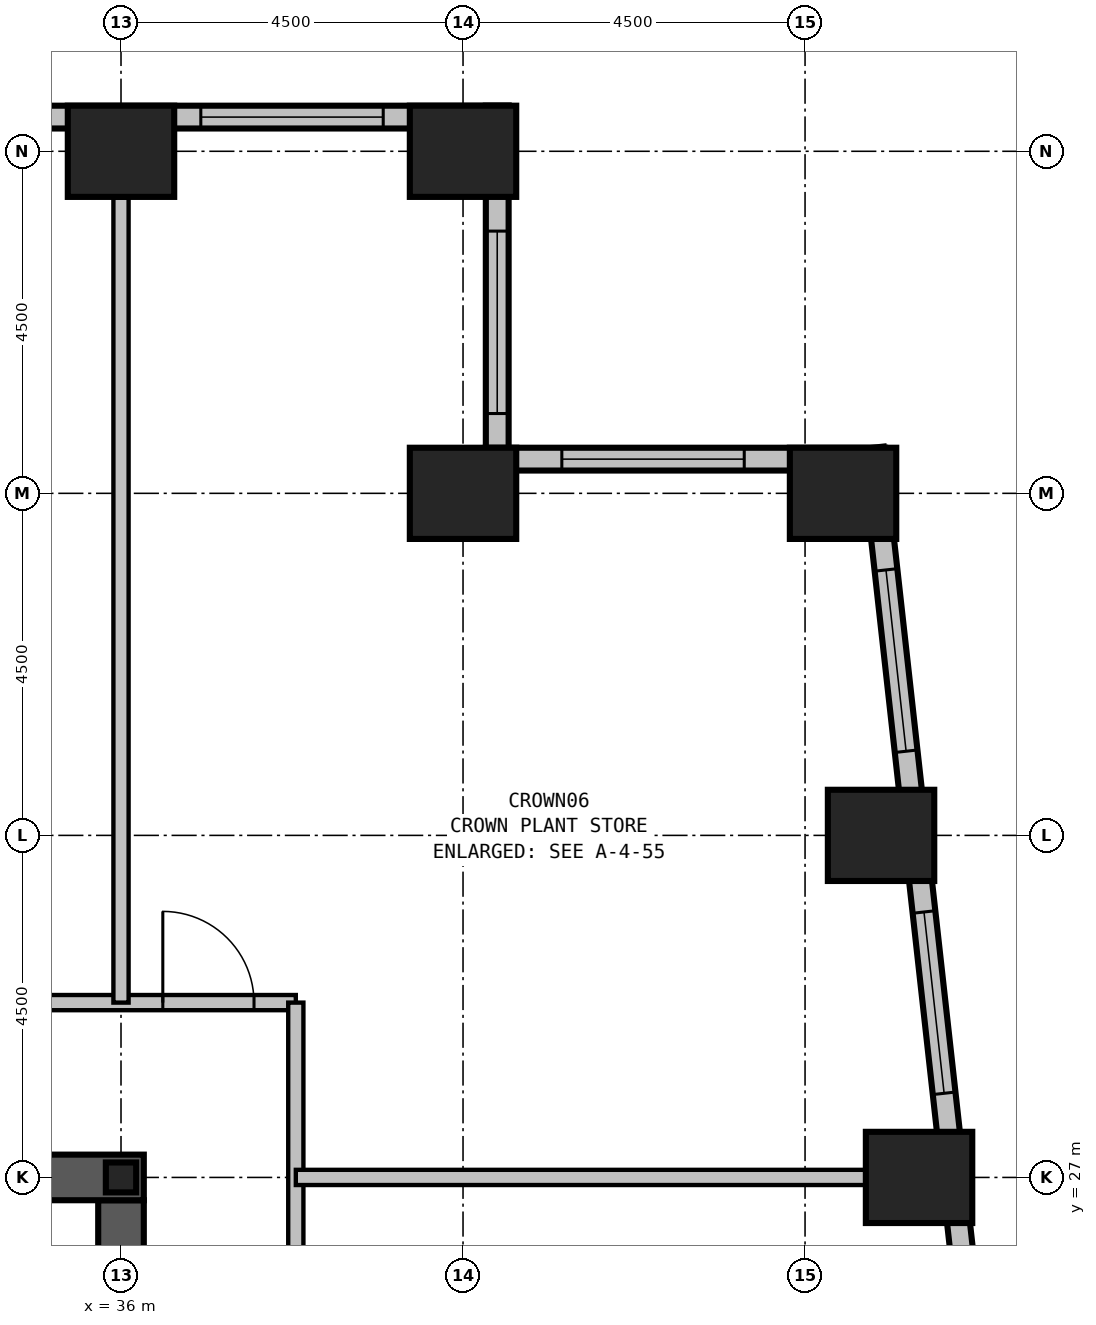
"""IFC4 building model, lengths in metres.
Left out: names, types, materials, properties, quantities, classifications, styles, units other than length and angle.
Written with IfcOpenShell. Run it as: python <this file> out.ifc"""

import sys

from ifc_helpers import new_model, si_unit, direction, frame, frame_2d, origin, origin_2d, place, context, subcontext, project, spatial, polyline, rectangle, i_section, outline, extrude, clip, halfspace, element, fill, save


model = new_model("IFC4")
c1 = context("Model", 3, precision=1e-05, world=origin(), true_north=direction((0.0, 1.0)))
c2 = subcontext(c1, "Body", "Model", "MODEL_VIEW")
j1 = project(units=[si_unit("LENGTHUNIT", "METRE"), si_unit("PLANEANGLEUNIT", "RADIAN")], contexts=[c1])
p1 = place(None, origin())
s1 = spatial("IfcSite", under=j1, at=p1, CompositionType="ELEMENT")
p2 = place(p1, origin())
s2 = spatial("IfcBuilding", under=s1, at=p2, CompositionType="ELEMENT")
p3 = place(p2, frame((0.0, 0.0, 289.7)))
s3 = spatial("IfcBuildingStorey", under=s2, at=p3, CompositionType="ELEMENT", Elevation=289.7)
p4 = place(p3, frame((46.5, 27.0, 0.0), z_axis=(0.0, 0.0, 1.0), x_axis=(1.0, 0.0, 0.0)))
e1 = element("IfcColumn", 1, at=p4, inside=s3, PredefinedType="COLUMN", context=c2, shape_type="Clipping", body=[
    clip(extrude(rectangle(XDim=1.4, YDim=1.2, at=origin_2d()), origin(), (0.0, 0.0, 1.0), 19.823), halfspace(frame((0.0, 0.0, 19.871), z_axis=(-0.294483896091, -0.25767390908, 0.920262675285), x_axis=(0.952424195267, 0.0, 0.304775576894)), False)),
])
p5 = place(p3, frame((46.0, 31.5, 0.0), z_axis=(0.0, 0.0, 1.0), x_axis=(1.0, 0.0, 0.0)))
e2 = element("IfcColumn", 2, at=p5, inside=s3, PredefinedType="COLUMN", context=c2, shape_type="Clipping", body=[
    clip(extrude(rectangle(XDim=1.4, YDim=1.2, at=origin_2d()), origin(), (0.0, 0.0, 1.0), 20.923), halfspace(frame((0.0, 0.0, 20.971), z_axis=(-0.294483896091, -0.25767390908, 0.920262675285), x_axis=(0.952424195267, 0.0, 0.304775576894)), False)),
])
p6 = place(p3, frame((45.5, 36.0, 0.0), z_axis=(0.0, 0.0, 1.0), x_axis=(1.0, 0.0, 0.0)))
e3 = element("IfcColumn", 3, at=p6, inside=s3, PredefinedType="COLUMN", context=c2, shape_type="Clipping", body=[
    clip(extrude(rectangle(XDim=1.4, YDim=1.2, at=origin_2d()), origin(), (0.0, 0.0, 1.0), 22.023), halfspace(frame((0.0, 0.0, 22.071), z_axis=(-0.294483896091, -0.25767390908, 0.920262675285), x_axis=(0.952424195267, 0.0, 0.304775576894)), False)),
])
p7 = place(p3, frame((40.5, 36.0, 0.0), z_axis=(0.0, 0.0, 1.0), x_axis=(1.0, 0.0, 0.0)))
e4 = element("IfcColumn", 4, at=p7, inside=s3, PredefinedType="COLUMN", context=c2, shape_type="Clipping", body=[
    clip(extrude(rectangle(XDim=1.4, YDim=1.2, at=origin_2d()), origin(), (0.0, 0.0, 1.0), 20.423), halfspace(frame((0.0, 0.0, 20.471), z_axis=(-0.294483896091, -0.25767390908, 0.920262675285), x_axis=(0.952424195267, 0.0, 0.304775576894)), False)),
])
p8 = place(p3, frame((40.5, 40.5, 0.0), z_axis=(0.0, 0.0, 1.0), x_axis=(1.0, 0.0, 0.0)))
e5 = element("IfcColumn", 5, at=p8, inside=s3, PredefinedType="COLUMN", context=c2, shape_type="Clipping", body=[
    clip(extrude(rectangle(XDim=1.4, YDim=1.2, at=origin_2d()), origin(), (0.0, 0.0, 1.0), 21.683), halfspace(frame((0.0, 0.0, 21.731), z_axis=(-0.294483896091, -0.25767390908, 0.920262675285), x_axis=(0.952424195267, 0.0, 0.304775576894)), False)),
])
p9 = place(p3, frame((36.0, 40.5, 0.0), z_axis=(0.0, 0.0, 1.0), x_axis=(1.0, 0.0, 0.0)))
e6 = element("IfcColumn", 6, at=p9, inside=s3, PredefinedType="COLUMN", context=c2, shape_type="Clipping", body=[
    clip(extrude(rectangle(XDim=1.4, YDim=1.2, at=origin_2d()), origin(), (0.0, 0.0, 1.0), 20.243), halfspace(frame((0.0, 0.0, 20.291), z_axis=(-0.294483896091, -0.25767390908, 0.920262675285), x_axis=(0.952424195267, 0.0, 0.304775576894)), False)),
])
p10 = place(p3, frame((36.3, 27.0, 0.0), z_axis=(0.0, 0.0, 1.0), x_axis=(-1.0, 0.0, 0.0)))
e7 = element("IfcWall", 7, at=p10, inside=s3, PredefinedType="SHEAR", context=c2, shape_type="SweptSolid", body=[
    extrude(rectangle(XDim=23.6, YDim=0.6, at=frame_2d((11.8, 0.0))), origin(), (0.0, 0.0, 1.0), 4.0),
])
p11 = place(p10, frame((17.05, 0.0, 0.0)))
e8 = element("IfcOpeningElement", 8, at=p11, cuts=e7, PredefinedType="OPENING", context=c2, shape_type="SweptSolid", body=[
    extrude(rectangle(XDim=1.0, YDim=2.1, at=frame_2d((0.5, 1.05))), frame((0.0, 0.31, 0.0), z_axis=(0.0, -1.0, 0.0), x_axis=(1.0, 0.0, 0.0)), (0.0, 0.0, 1.0), 0.62),
])
p12 = place(p10, frame((12.05, 0.0, 0.0)))
e9 = element("IfcOpeningElement", 9, at=p12, cuts=e7, PredefinedType="OPENING", context=c2, shape_type="SweptSolid", body=[
    extrude(rectangle(XDim=1.0, YDim=2.1, at=frame_2d((0.5, 1.05))), frame((0.0, 0.31, 0.0), z_axis=(0.0, -1.0, 0.0), x_axis=(1.0, 0.0, 0.0)), (0.0, 0.0, 1.0), 0.62),
])
p13 = place(p10, frame((7.05, 0.0, 0.0)))
e10 = element("IfcOpeningElement", 10, at=p13, cuts=e7, PredefinedType="OPENING", context=c2, shape_type="SweptSolid", body=[
    extrude(rectangle(XDim=1.0, YDim=2.1, at=frame_2d((0.5, 1.05))), frame((0.0, 0.31, 0.0), z_axis=(0.0, -1.0, 0.0), x_axis=(1.0, 0.0, 0.0)), (0.0, 0.0, 1.0), 0.62),
])
p14 = place(p3, frame((36.0, 20.0, 0.0), z_axis=(0.0, 0.0, 1.0), x_axis=(0.0, 1.0, 0.0)))
e11 = element("IfcWall", 11, at=p14, inside=s3, PredefinedType="SHEAR", context=c2, shape_type="SweptSolid", body=[
    extrude(rectangle(XDim=6.7, YDim=0.6, at=frame_2d((3.35, 0.0))), origin(), (0.0, 0.0, 1.0), 4.0),
])
p15 = place(p3, frame((36.0, 27.0, 4.0), z_axis=(0.0, 0.0, 1.0), x_axis=(1.0, 0.0, 0.0)))
e12 = element("IfcColumn", 12, at=p15, inside=s3, PredefinedType="COLUMN", context=c2, shape_type="SweptSolid", body=[
    extrude(i_section(OverallWidth=0.399, OverallDepth=0.394, WebThickness=0.023, FlangeThickness=0.037, FilletRadius=0.015, at=origin_2d()), origin(), (0.0, 0.0, 1.0), 11.49),
])
p16 = place(p3, frame((49.519, 3.901, -0.3), z_axis=(0.0, 0.0, 1.0), x_axis=(-0.110429082637, 0.993884006164, 0.0)))
e13 = element("IfcWall", 13, at=p16, inside=s3, PredefinedType="STANDARD", context=c2, shape_type="Clipping", body=[
    clip(extrude(outline(polyline([(0.0, 0.0), (32.899, 0.0), (32.899, 22.662), (0.0, 14.669), (0.0, 0.0)])), frame((0.0, 0.15, 0.0), z_axis=(0.0, -1.0, 0.0), x_axis=(1.0, 0.0, 0.0)), (0.0, 0.0, 1.0), 0.3), halfspace(frame((0.0, 0.0, 14.669), z_axis=(-0.223578390543, 0.321137527797, 0.920262675285), x_axis=(0.971732868163, 0.0, 0.236083105984)), False)),
])
p17 = place(p16, frame((1.717, 0.0, 0.8)))
e14 = element("IfcOpeningElement", 14, at=p17, cuts=e13, PredefinedType="OPENING", context=c2, shape_type="SweptSolid", body=[
    extrude(rectangle(XDim=2.4, YDim=1.8, at=frame_2d((1.2, 0.9))), frame((0.0, 0.16, 0.0), z_axis=(0.0, -1.0, 0.0), x_axis=(1.0, 0.0, 0.0)), (0.0, 0.0, 1.0), 0.32),
])
p18 = place(p16, frame((6.245, 0.0, 0.8)))
e15 = element("IfcOpeningElement", 15, at=p18, cuts=e13, PredefinedType="OPENING", context=c2, shape_type="SweptSolid", body=[
    extrude(rectangle(XDim=2.4, YDim=1.8, at=frame_2d((1.2, 0.9))), frame((0.0, 0.16, 0.0), z_axis=(0.0, -1.0, 0.0), x_axis=(1.0, 0.0, 0.0)), (0.0, 0.0, 1.0), 0.32),
])
p19 = place(p16, frame((10.772, 0.0, 0.8)))
e16 = element("IfcOpeningElement", 16, at=p19, cuts=e13, PredefinedType="OPENING", context=c2, shape_type="SweptSolid", body=[
    extrude(rectangle(XDim=2.4, YDim=1.8, at=frame_2d((1.2, 0.9))), frame((0.0, 0.16, 0.0), z_axis=(0.0, -1.0, 0.0), x_axis=(1.0, 0.0, 0.0)), (0.0, 0.0, 1.0), 0.32),
])
p20 = place(p16, frame((15.3, 0.0, 0.8)))
e17 = element("IfcOpeningElement", 17, at=p20, cuts=e13, PredefinedType="OPENING", context=c2, shape_type="SweptSolid", body=[
    extrude(rectangle(XDim=2.4, YDim=1.8, at=frame_2d((1.2, 0.9))), frame((0.0, 0.16, 0.0), z_axis=(0.0, -1.0, 0.0), x_axis=(1.0, 0.0, 0.0)), (0.0, 0.0, 1.0), 0.32),
])
p21 = place(p16, frame((19.828, 0.0, 0.8)))
e18 = element("IfcOpeningElement", 18, at=p21, cuts=e13, PredefinedType="OPENING", context=c2, shape_type="SweptSolid", body=[
    extrude(rectangle(XDim=2.4, YDim=1.8, at=frame_2d((1.2, 0.9))), frame((0.0, 0.16, 0.0), z_axis=(0.0, -1.0, 0.0), x_axis=(1.0, 0.0, 0.0)), (0.0, 0.0, 1.0), 0.32),
])
p22 = place(p16, frame((24.355, 0.0, 0.8)))
e19 = element("IfcOpeningElement", 19, at=p22, cuts=e13, PredefinedType="OPENING", context=c2, shape_type="SweptSolid", body=[
    extrude(rectangle(XDim=2.4, YDim=1.8, at=frame_2d((1.2, 0.9))), frame((0.0, 0.16, 0.0), z_axis=(0.0, -1.0, 0.0), x_axis=(1.0, 0.0, 0.0)), (0.0, 0.0, 1.0), 0.32),
])
p23 = place(p16, frame((28.883, 0.0, 0.8)))
e20 = element("IfcOpeningElement", 20, at=p23, cuts=e13, PredefinedType="OPENING", context=c2, shape_type="SweptSolid", body=[
    extrude(rectangle(XDim=2.4, YDim=1.8, at=frame_2d((1.2, 0.9))), frame((0.0, 0.16, 0.0), z_axis=(0.0, -1.0, 0.0), x_axis=(1.0, 0.0, 0.0)), (0.0, 0.0, 1.0), 0.32),
])
p24 = place(p3, frame((46.053, 36.45, -0.3), z_axis=(0.0, 0.0, 1.0), x_axis=(-1.0, 0.0, 0.0)))
e21 = element("IfcWall", 21, at=p24, inside=s3, PredefinedType="STANDARD", context=c2, shape_type="Clipping", body=[
    clip(extrude(outline(polyline([(0.0, 0.0), (5.253, 0.0), (5.253, 20.993), (0.0, 22.674), (0.0, 0.0)])), frame((0.0, 0.15, 0.0), z_axis=(0.0, -1.0, 0.0), x_axis=(1.0, 0.0, 0.0)), (0.0, 0.0, 1.0), 0.3), halfspace(frame((0.0, 0.0, 22.674), z_axis=(0.294483896091, 0.25767390908, 0.920262675285), x_axis=(0.952424195267, 0.0, -0.304775576894)), False)),
])
p25 = place(p24, frame((1.853, 0.0, 0.8)))
e22 = element("IfcOpeningElement", 22, at=p25, cuts=e21, PredefinedType="OPENING", context=c2, shape_type="SweptSolid", body=[
    extrude(rectangle(XDim=2.4, YDim=1.8, at=frame_2d((1.2, 0.9))), frame((0.0, 0.16, 0.0), z_axis=(0.0, -1.0, 0.0), x_axis=(1.0, 0.0, 0.0)), (0.0, 0.0, 1.0), 0.32),
])
p26 = place(p3, frame((40.95, 36.3, -0.3), z_axis=(0.0, 0.0, 1.0), x_axis=(0.0, 1.0, 0.0)))
e23 = element("IfcWall", 23, at=p26, inside=s3, PredefinedType="STANDARD", context=c2, shape_type="Clipping", body=[
    clip(extrude(outline(polyline([(0.0, 0.0), (4.8, 0.0), (4.8, 22.343), (0.0, 20.999), (0.0, 0.0)])), frame((0.0, 0.15, 0.0), z_axis=(0.0, -1.0, 0.0), x_axis=(1.0, 0.0, 0.0)), (0.0, 0.0, 1.0), 0.3), halfspace(frame((0.0, 0.0, 20.999), z_axis=(-0.25767390908, 0.294483896091, 0.920262675285), x_axis=(0.962963921905, 0.0, 0.269630274838)), False)),
])
p27 = place(p26, frame((0.75, 0.0, 0.8)))
e24 = element("IfcOpeningElement", 24, at=p27, cuts=e23, PredefinedType="OPENING", context=c2, shape_type="SweptSolid", body=[
    extrude(rectangle(XDim=2.4, YDim=1.8, at=frame_2d((1.2, 0.9))), frame((0.0, 0.16, 0.0), z_axis=(0.0, -1.0, 0.0), x_axis=(1.0, 0.0, 0.0)), (0.0, 0.0, 1.0), 0.32),
])
p28 = place(p3, frame((41.1, 40.95, -0.3), z_axis=(0.0, 0.0, 1.0), x_axis=(-1.0, 0.0, 0.0)))
e25 = element("IfcWall", 25, at=p28, inside=s3, PredefinedType="STANDARD", context=c2, shape_type="Clipping", body=[
    clip(extrude(outline(polyline([(0.0, 0.0), (28.153, 0.0), (28.153, 13.34), (0.0, 22.349), (0.0, 0.0)])), frame((0.0, 0.15, 0.0), z_axis=(0.0, -1.0, 0.0), x_axis=(1.0, 0.0, 0.0)), (0.0, 0.0, 1.0), 0.3), halfspace(frame((0.0, 0.0, 22.349), z_axis=(0.294483896091, 0.25767390908, 0.920262675285), x_axis=(0.952424195267, 0.0, -0.304775576894)), False)),
])
p29 = place(p28, frame((1.65, 0.0, 0.8)))
e26 = element("IfcOpeningElement", 26, at=p29, cuts=e25, PredefinedType="OPENING", context=c2, shape_type="SweptSolid", body=[
    extrude(rectangle(XDim=2.4, YDim=1.8, at=frame_2d((1.2, 0.9))), frame((0.0, 0.16, 0.0), z_axis=(0.0, -1.0, 0.0), x_axis=(1.0, 0.0, 0.0)), (0.0, 0.0, 1.0), 0.32),
])
p30 = place(p28, frame((6.15, 0.0, 0.8)))
e27 = element("IfcOpeningElement", 27, at=p30, cuts=e25, PredefinedType="OPENING", context=c2, shape_type="SweptSolid", body=[
    extrude(rectangle(XDim=2.4, YDim=1.8, at=frame_2d((1.2, 0.9))), frame((0.0, 0.16, 0.0), z_axis=(0.0, -1.0, 0.0), x_axis=(1.0, 0.0, 0.0)), (0.0, 0.0, 1.0), 0.32),
])
p31 = place(p28, frame((10.65, 0.0, 0.8)))
e28 = element("IfcOpeningElement", 28, at=p31, cuts=e25, PredefinedType="OPENING", context=c2, shape_type="SweptSolid", body=[
    extrude(rectangle(XDim=2.4, YDim=1.8, at=frame_2d((1.2, 0.9))), frame((0.0, 0.16, 0.0), z_axis=(0.0, -1.0, 0.0), x_axis=(1.0, 0.0, 0.0)), (0.0, 0.0, 1.0), 0.32),
])
p32 = place(p28, frame((15.15, 0.0, 0.8)))
e29 = element("IfcOpeningElement", 29, at=p32, cuts=e25, PredefinedType="OPENING", context=c2, shape_type="SweptSolid", body=[
    extrude(rectangle(XDim=2.4, YDim=1.8, at=frame_2d((1.2, 0.9))), frame((0.0, 0.16, 0.0), z_axis=(0.0, -1.0, 0.0), x_axis=(1.0, 0.0, 0.0)), (0.0, 0.0, 1.0), 0.32),
])
p33 = place(p28, frame((19.65, 0.0, 0.8)))
e30 = element("IfcOpeningElement", 30, at=p33, cuts=e25, PredefinedType="OPENING", context=c2, shape_type="SweptSolid", body=[
    extrude(rectangle(XDim=2.4, YDim=1.8, at=frame_2d((1.2, 0.9))), frame((0.0, 0.16, 0.0), z_axis=(0.0, -1.0, 0.0), x_axis=(1.0, 0.0, 0.0)), (0.0, 0.0, 1.0), 0.32),
])
p34 = place(p28, frame((24.15, 0.0, 0.8)))
e31 = element("IfcOpeningElement", 31, at=p34, cuts=e25, PredefinedType="OPENING", context=c2, shape_type="SweptSolid", body=[
    extrude(rectangle(XDim=2.4, YDim=1.8, at=frame_2d((1.2, 0.9))), frame((0.0, 0.16, 0.0), z_axis=(0.0, -1.0, 0.0), x_axis=(1.0, 0.0, 0.0)), (0.0, 0.0, 1.0), 0.32),
])
p35 = place(p3, frame((38.3, 11.2, 0.0), z_axis=(0.0, 0.0, 1.0), x_axis=(0.0, 1.0, 0.0)))
e32 = element("IfcWall", 32, at=p35, inside=s3, PredefinedType="PARTITIONING", context=c2, shape_type="SweptSolid", body=[
    extrude(rectangle(XDim=18.1, YDim=0.2, at=frame_2d((9.05, 0.0))), origin(), (0.0, 0.0, 1.0), 4.0),
])
p36 = place(p35, frame((3.95, 0.0, 0.0), z_axis=(0.0, 0.0, 1.0), x_axis=(-1.0, 0.0, 0.0)))
e33 = element("IfcOpeningElement", 33, at=p36, cuts=e32, PredefinedType="OPENING", context=c2, shape_type="SweptSolid", body=[
    extrude(rectangle(XDim=1.2, YDim=2.1, at=frame_2d((0.6, 1.05))), frame((0.0, 0.11, 0.0), z_axis=(0.0, -1.0, 0.0), x_axis=(1.0, 0.0, 0.0)), (0.0, 0.0, 1.0), 0.22),
])
p37 = place(p35, frame((12.75, 0.0, 0.0), z_axis=(0.0, 0.0, 1.0), x_axis=(-1.0, 0.0, 0.0)))
e34 = element("IfcOpeningElement", 34, at=p37, cuts=e32, PredefinedType="OPENING", context=c2, shape_type="SweptSolid", body=[
    extrude(rectangle(XDim=1.0, YDim=2.1, at=frame_2d((0.5, 1.05))), frame((0.0, 0.11, 0.0), z_axis=(0.0, -1.0, 0.0), x_axis=(1.0, 0.0, 0.0)), (0.0, 0.0, 1.0), 0.22),
])
p38 = place(p3, frame((13.5, 29.3, 0.0), z_axis=(0.0, 0.0, 1.0), x_axis=(1.0, 0.0, 0.0)))
e35 = element("IfcWall", 35, at=p38, inside=s3, PredefinedType="PARTITIONING", context=c2, shape_type="SweptSolid", body=[
    extrude(rectangle(XDim=24.8, YDim=0.2, at=frame_2d((12.4, 0.0))), origin(), (0.0, 0.0, 1.0), 4.0),
])
p39 = place(p38, frame((0.45, 0.0, 0.0)))
e36 = element("IfcOpeningElement", 36, at=p39, cuts=e35, PredefinedType="OPENING", context=c2, shape_type="SweptSolid", body=[
    extrude(rectangle(XDim=1.2, YDim=2.1, at=frame_2d((0.6, 1.05))), frame((0.0, 0.11, 0.0), z_axis=(0.0, -1.0, 0.0), x_axis=(1.0, 0.0, 0.0)), (0.0, 0.0, 1.0), 0.22),
])
p40 = place(p38, frame((13.95, 0.0, 0.0)))
e37 = element("IfcOpeningElement", 37, at=p40, cuts=e35, PredefinedType="OPENING", context=c2, shape_type="SweptSolid", body=[
    extrude(rectangle(XDim=1.2, YDim=2.1, at=frame_2d((0.6, 1.05))), frame((0.0, 0.11, 0.0), z_axis=(0.0, -1.0, 0.0), x_axis=(1.0, 0.0, 0.0)), (0.0, 0.0, 1.0), 0.22),
])
p41 = place(p38, frame((23.05, 0.0, 0.0)))
e38 = element("IfcOpeningElement", 38, at=p41, cuts=e35, PredefinedType="OPENING", context=c2, shape_type="SweptSolid", body=[
    extrude(rectangle(XDim=1.2, YDim=2.1, at=frame_2d((0.6, 1.05))), frame((0.0, 0.11, 0.0), z_axis=(0.0, -1.0, 0.0), x_axis=(1.0, 0.0, 0.0)), (0.0, 0.0, 1.0), 0.22),
])
p42 = place(p3, frame((38.3, 27.0, 0.0), z_axis=(0.0, 0.0, 1.0), x_axis=(1.0, 0.0, 0.0)))
e39 = element("IfcWall", 39, at=p42, inside=s3, PredefinedType="PARTITIONING", context=c2, shape_type="SweptSolid", body=[
    extrude(rectangle(XDim=7.499, YDim=0.2, at=frame_2d((3.75, 0.0))), origin(), (0.0, 0.0, 1.0), 4.0),
])
p43 = place(p3, frame((36.0, 29.3, 0.0), z_axis=(0.0, 0.0, 1.0), x_axis=(0.0, 1.0, 0.0)))
e40 = element("IfcWall", 40, at=p43, inside=s3, PredefinedType="PARTITIONING", context=c2, shape_type="SweptSolid", body=[
    extrude(rectangle(XDim=10.59, YDim=0.2, at=frame_2d((5.295, 0.0))), origin(), (0.0, 0.0, 1.0), 4.0),
])
p44 = place(p22, origin())
e41 = element("IfcWindow", 41, at=p44, inside=s3, PartitioningType="SINGLE_PANEL", PredefinedType="USERDEFINED", context=c2, shape_type="SweptSolid", body=[
    extrude(rectangle(XDim=2.4, YDim=1.8, at=frame_2d((1.2, 0.9))), frame((0.0, 0.03, 0.0), z_axis=(0.0, -1.0, 0.0), x_axis=(1.0, 0.0, 0.0)), (0.0, 0.0, 1.0), 0.06),
])
fill(e19, e41)
p45 = place(p23, origin())
e42 = element("IfcWindow", 42, at=p45, inside=s3, PartitioningType="SINGLE_PANEL", PredefinedType="USERDEFINED", context=c2, shape_type="SweptSolid", body=[
    extrude(rectangle(XDim=2.4, YDim=1.8, at=frame_2d((1.2, 0.9))), frame((0.0, 0.03, 0.0), z_axis=(0.0, -1.0, 0.0), x_axis=(1.0, 0.0, 0.0)), (0.0, 0.0, 1.0), 0.06),
])
fill(e20, e42)
p46 = place(p25, origin())
e43 = element("IfcWindow", 43, at=p46, inside=s3, PartitioningType="SINGLE_PANEL", PredefinedType="USERDEFINED", context=c2, shape_type="SweptSolid", body=[
    extrude(rectangle(XDim=2.4, YDim=1.8, at=frame_2d((1.2, 0.9))), frame((0.0, 0.03, 0.0), z_axis=(0.0, -1.0, 0.0), x_axis=(1.0, 0.0, 0.0)), (0.0, 0.0, 1.0), 0.06),
])
fill(e22, e43)
p47 = place(p27, origin())
e44 = element("IfcWindow", 44, at=p47, inside=s3, PartitioningType="SINGLE_PANEL", PredefinedType="USERDEFINED", context=c2, shape_type="SweptSolid", body=[
    extrude(rectangle(XDim=2.4, YDim=1.8, at=frame_2d((1.2, 0.9))), frame((0.0, 0.03, 0.0), z_axis=(0.0, -1.0, 0.0), x_axis=(1.0, 0.0, 0.0)), (0.0, 0.0, 1.0), 0.06),
])
fill(e24, e44)
p48 = place(p29, origin())
e45 = element("IfcWindow", 45, at=p48, inside=s3, PartitioningType="SINGLE_PANEL", PredefinedType="USERDEFINED", context=c2, shape_type="SweptSolid", body=[
    extrude(rectangle(XDim=2.4, YDim=1.8, at=frame_2d((1.2, 0.9))), frame((0.0, 0.03, 0.0), z_axis=(0.0, -1.0, 0.0), x_axis=(1.0, 0.0, 0.0)), (0.0, 0.0, 1.0), 0.06),
])
fill(e26, e45)
p49 = place(p41, origin())
e46 = element("IfcDoor", 46, at=p49, inside=s3, OperationType="SINGLE_SWING_LEFT", PredefinedType="DOOR", context=c2, shape_type="SweptSolid", body=[
    extrude(rectangle(XDim=1.2, YDim=2.1, at=frame_2d((0.6, 1.05))), frame((0.0, 0.025, 0.0), z_axis=(0.0, -1.0, 0.0), x_axis=(1.0, 0.0, 0.0)), (0.0, 0.0, 1.0), 0.05),
])
fill(e38, e46)
save(model, sys.argv[1])
